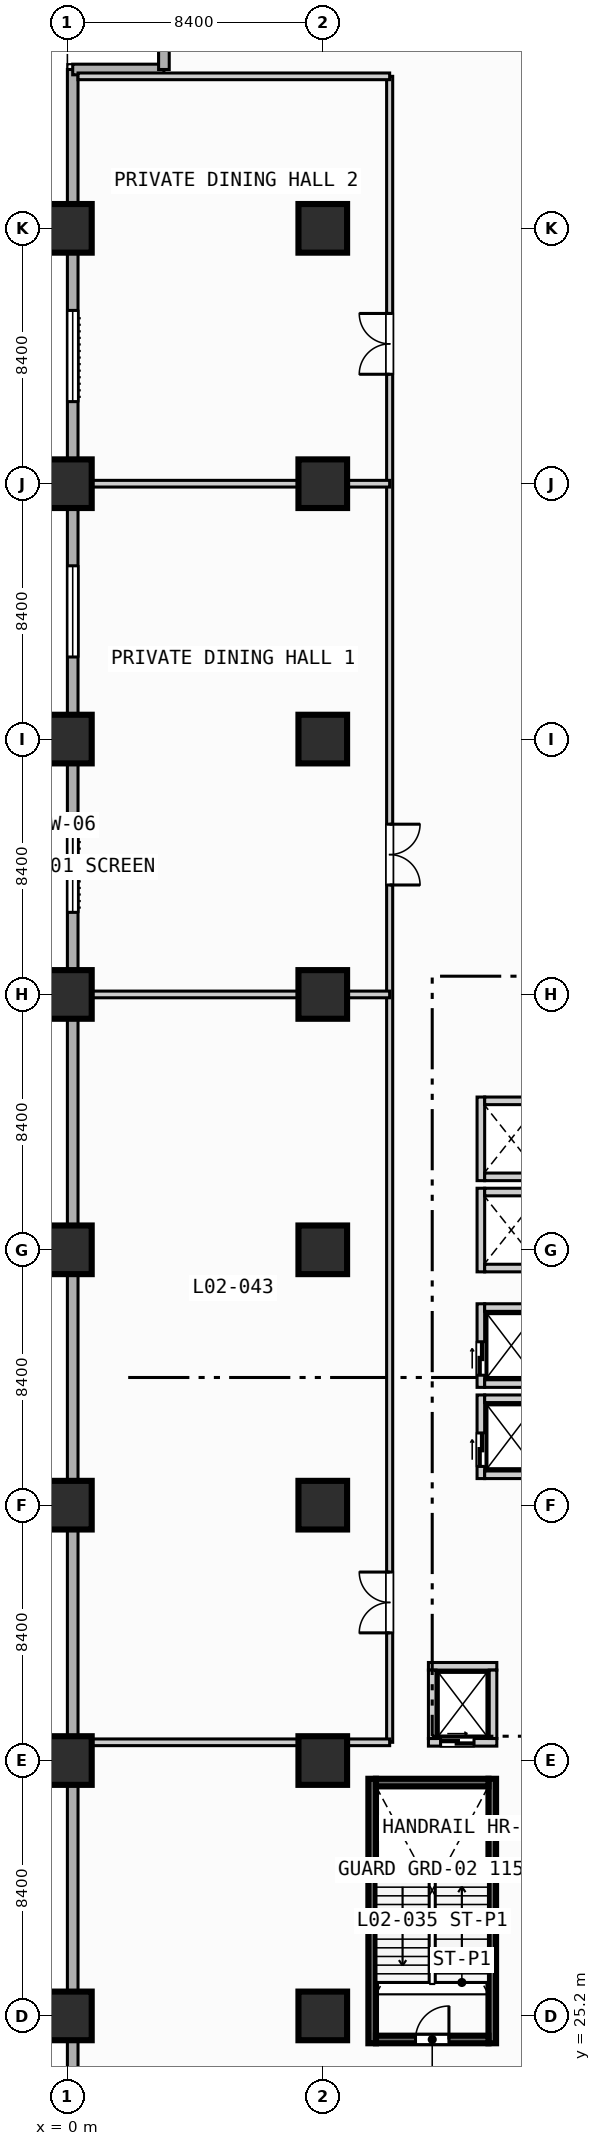
"""IFC4 building model, lengths in metres.
Left out: names, types, materials, properties, quantities, classifications, styles, units other than length and angle.
Written with IfcOpenShell. Run it as: python <this file> out.ifc"""

import sys

from ifc_helpers import new_model, si_unit, direction, frame, frame_2d, origin, origin_2d, place, context, subcontext, project, spatial, rectangle, extrude, element, fill, save


model = new_model("IFC4")
c1 = context("Model", 3, precision=1e-05, world=origin(), true_north=direction((0.0, 1.0)))
c2 = subcontext(c1, "Body", "Model", "MODEL_VIEW")
j1 = project(units=[si_unit("LENGTHUNIT", "METRE"), si_unit("PLANEANGLEUNIT", "RADIAN")], contexts=[c1])
p1 = place(None, origin())
s1 = spatial("IfcSite", under=j1, at=p1, CompositionType="ELEMENT")
p2 = place(p1, origin())
s2 = spatial("IfcBuilding", under=s1, at=p2, CompositionType="ELEMENT")
p3 = place(p2, frame((0.0, 0.0, 10.8)))
s3 = spatial("IfcBuildingStorey", under=s2, at=p3, CompositionType="ELEMENT", Elevation=10.8)
for number, where, z_axis, x_axis in (
    (1, (10.025, 24.3, 0.0), (0.0, 0.0, 1.0), (0.0, 1.0, 0.0)),
    (2, (13.975, 24.3, 0.0), (0.0, 0.0, 1.0), (0.0, 1.0, 0.0)),
):
    element("IfcWall", number, at=place(p3, frame(where, z_axis=z_axis, x_axis=x_axis)), inside=s3, PredefinedType="SOLIDWALL", context=c2, shape_type="SweptSolid", body=[
        extrude(rectangle(XDim=8.7, YDim=0.25, at=frame_2d((4.35, 0.0))), origin(), (0.0, 0.0, 1.0), 4.45),
    ])
p4 = place(p3, frame((10.15, 32.875, 0.0), z_axis=(0.0, 0.0, 1.0), x_axis=(1.0, 0.0, 0.0)))
e3 = element("IfcWall", 3, at=p4, inside=s3, PredefinedType="SOLIDWALL", context=c2, shape_type="SweptSolid", body=[
    extrude(rectangle(XDim=3.7, YDim=0.25, at=frame_2d((1.85, 0.0))), origin(), (0.0, 0.0, 1.0), 4.45),
])
for number, where, z_axis, x_axis in (
    (4, (0.0, 25.2, 0.0), (0.0, 0.0, 1.0), (1.0, 0.0, 0.0)),
    (5, (0.0, 33.6, 0.0), (0.0, 0.0, 1.0), (1.0, 0.0, 0.0)),
    (6, (0.0, 42.0, 0.0), (0.0, 0.0, 1.0), (1.0, 0.0, 0.0)),
    (7, (0.0, 50.4, 0.0), (0.0, 0.0, 1.0), (1.0, 0.0, 0.0)),
    (8, (0.0, 58.8, 0.0), (0.0, 0.0, 1.0), (1.0, 0.0, 0.0)),
    (9, (0.0, 67.2, 0.0), (0.0, 0.0, 1.0), (1.0, 0.0, 0.0)),
    (10, (0.0, 75.6, 0.0), (0.0, 0.0, 1.0), (1.0, 0.0, 0.0)),
    (11, (0.0, 84.0, 0.0), (0.0, 0.0, 1.0), (1.0, 0.0, 0.0)),
    (12, (8.4, 25.2, 0.0), (0.0, 0.0, 1.0), (1.0, 0.0, 0.0)),
    (13, (8.4, 33.6, 0.0), (0.0, 0.0, 1.0), (1.0, 0.0, 0.0)),
    (14, (8.4, 42.0, 0.0), (0.0, 0.0, 1.0), (1.0, 0.0, 0.0)),
    (15, (8.4, 50.4, 0.0), (0.0, 0.0, 1.0), (1.0, 0.0, 0.0)),
    (16, (8.4, 58.8, 0.0), (0.0, 0.0, 1.0), (1.0, 0.0, 0.0)),
    (17, (8.4, 67.2, 0.0), (0.0, 0.0, 1.0), (1.0, 0.0, 0.0)),
    (18, (8.4, 75.6, 0.0), (0.0, 0.0, 1.0), (1.0, 0.0, 0.0)),
    (19, (8.4, 84.0, 0.0), (0.0, 0.0, 1.0), (1.0, 0.0, 0.0)),
):
    element("IfcColumn", number, at=place(p3, frame(where, z_axis=z_axis, x_axis=x_axis)), inside=s3, PredefinedType="COLUMN", context=c2, shape_type="SweptSolid", body=[
        extrude(rectangle(XDim=1.6, YDim=1.6, at=origin_2d()), origin(), (0.0, 0.0, 1.0), 4.8),
    ])
p5 = place(p3, frame((0.175, 3.175, 0.0), z_axis=(0.0, 0.0, 1.0), x_axis=(0.0, 1.0, 0.0)))
e20 = element("IfcWall", 20, at=p5, inside=s3, PredefinedType="STANDARD", context=c2, shape_type="SweptSolid", body=[
    extrude(rectangle(XDim=86.05, YDim=0.35, at=frame_2d((43.025, 0.0))), origin(), (0.0, 0.0, 1.0), 4.45),
])
p6 = place(p5, frame((58.325, 0.0, 0.85)))
e21 = element("IfcOpeningElement", 21, at=p6, cuts=e20, PredefinedType="OPENING", context=c2, shape_type="SweptSolid", body=[
    extrude(rectangle(XDim=3.0, YDim=2.4, at=frame_2d((1.5, 1.2))), frame((0.0, 0.185, 0.0), z_axis=(0.0, -1.0, 0.0), x_axis=(1.0, 0.0, 0.0)), (0.0, 0.0, 1.0), 0.37),
])
p7 = place(p5, frame((66.725, 0.0, 0.85)))
e22 = element("IfcOpeningElement", 22, at=p7, cuts=e20, PredefinedType="OPENING", context=c2, shape_type="SweptSolid", body=[
    extrude(rectangle(XDim=3.0, YDim=2.4, at=frame_2d((1.5, 1.2))), frame((0.0, 0.185, 0.0), z_axis=(0.0, -1.0, 0.0), x_axis=(1.0, 0.0, 0.0)), (0.0, 0.0, 1.0), 0.37),
])
p8 = place(p5, frame((75.125, 0.0, 0.85)))
e23 = element("IfcOpeningElement", 23, at=p8, cuts=e20, PredefinedType="OPENING", context=c2, shape_type="SweptSolid", body=[
    extrude(rectangle(XDim=3.0, YDim=2.4, at=frame_2d((1.5, 1.2))), frame((0.0, 0.185, 0.0), z_axis=(0.0, -1.0, 0.0), x_axis=(1.0, 0.0, 0.0)), (0.0, 0.0, 1.0), 0.37),
])
for number, where, z_axis, x_axis in (
    (24, (0.175, 89.225, 0.0), (0.0, 0.0, 1.0), (1.0, 0.0, 0.0)),
    (25, (3.175, 89.225, 0.0), (0.0, 0.0, 1.0), (0.0, 1.0, 0.0)),
):
    element("IfcWall", number, at=place(p3, frame(where, z_axis=z_axis, x_axis=x_axis)), inside=s3, PredefinedType="STANDARD", context=c2, shape_type="SweptSolid", body=[
        extrude(rectangle(XDim=3.0, YDim=0.35, at=frame_2d((1.5, 0.0))), origin(), (0.0, 0.0, 1.0), 4.45),
    ])
p9 = place(p3, frame((11.875, 34.2, 0.0), z_axis=(0.0, 0.0, 1.0), x_axis=(1.0, 0.0, 0.0)))
e26 = element("IfcWall", 26, at=p9, inside=s3, PredefinedType="SOLIDWALL", context=c2, shape_type="SweptSolid", body=[
    extrude(rectangle(XDim=2.25, YDim=0.25, at=frame_2d((1.125, 0.0))), origin(), (0.0, 0.0, 1.0), 4.45),
])
p10 = place(p9, frame((0.4, 0.0, 0.0)))
e27 = element("IfcOpeningElement", 27, at=p10, cuts=e26, PredefinedType="OPENING", context=c2, shape_type="SweptSolid", body=[
    extrude(rectangle(XDim=1.1, YDim=2.15, at=frame_2d((0.55, 1.075))), frame((0.0, 0.135, 0.0), z_axis=(0.0, -1.0, 0.0), x_axis=(1.0, 0.0, 0.0)), (0.0, 0.0, 1.0), 0.27),
])
for number, where, z_axis, x_axis in (
    (28, (11.875, 36.7, 0.0), (0.0, 0.0, 1.0), (1.0, 0.0, 0.0)),
    (29, (12.0, 34.325, 0.0), (0.0, 0.0, 1.0), (0.0, 1.0, 0.0)),
    (30, (14.0, 34.325, 0.0), (0.0, 0.0, 1.0), (0.0, 1.0, 0.0)),
):
    element("IfcWall", number, at=place(p3, frame(where, z_axis=z_axis, x_axis=x_axis)), inside=s3, PredefinedType="SOLIDWALL", context=c2, shape_type="SweptSolid", body=[
        extrude(rectangle(XDim=2.25, YDim=0.25, at=frame_2d((1.125, 0.0))), origin(), (0.0, 0.0, 1.0), 4.45),
    ])
p11 = place(p3, frame((13.6, 42.875, 0.0), z_axis=(0.0, 0.0, 1.0), x_axis=(0.0, 1.0, 0.0)))
e31 = element("IfcWall", 31, at=p11, inside=s3, PredefinedType="SOLIDWALL", context=c2, shape_type="SweptSolid", body=[
    extrude(rectangle(XDim=2.75, YDim=0.25, at=frame_2d((1.375, 0.0))), origin(), (0.0, 0.0, 1.0), 4.45),
])
p12 = place(p11, frame((0.4, 0.0, 0.0)))
e32 = element("IfcOpeningElement", 32, at=p12, cuts=e31, PredefinedType="OPENING", context=c2, shape_type="SweptSolid", body=[
    extrude(rectangle(XDim=1.1, YDim=2.15, at=frame_2d((0.55, 1.075))), frame((0.0, 0.135, 0.0), z_axis=(0.0, -1.0, 0.0), x_axis=(1.0, 0.0, 0.0)), (0.0, 0.0, 1.0), 0.27),
])
for number, where, z_axis, x_axis in (
    (33, (13.725, 43.0, 0.0), (0.0, 0.0, 1.0), (1.0, 0.0, 0.0)),
    (34, (13.725, 45.5, 0.0), (0.0, 0.0, 1.0), (1.0, 0.0, 0.0)),
):
    element("IfcWall", number, at=place(p3, frame(where, z_axis=z_axis, x_axis=x_axis)), inside=s3, PredefinedType="SOLIDWALL", context=c2, shape_type="SweptSolid", body=[
        extrude(rectangle(XDim=1.75, YDim=0.25, at=frame_2d((0.875, 0.0))), origin(), (0.0, 0.0, 1.0), 4.45),
    ])
p13 = place(p3, frame((13.6, 45.875, 0.0), z_axis=(0.0, 0.0, 1.0), x_axis=(0.0, 1.0, 0.0)))
e35 = element("IfcWall", 35, at=p13, inside=s3, PredefinedType="SOLIDWALL", context=c2, shape_type="SweptSolid", body=[
    extrude(rectangle(XDim=2.75, YDim=0.25, at=frame_2d((1.375, 0.0))), origin(), (0.0, 0.0, 1.0), 4.45),
])
p14 = place(p13, frame((0.4, 0.0, 0.0)))
e36 = element("IfcOpeningElement", 36, at=p14, cuts=e35, PredefinedType="OPENING", context=c2, shape_type="SweptSolid", body=[
    extrude(rectangle(XDim=1.1, YDim=2.15, at=frame_2d((0.55, 1.075))), frame((0.0, 0.135, 0.0), z_axis=(0.0, -1.0, 0.0), x_axis=(1.0, 0.0, 0.0)), (0.0, 0.0, 1.0), 0.27),
])
for number, where, z_axis, x_axis in (
    (37, (13.725, 46.0, 0.0), (0.0, 0.0, 1.0), (1.0, 0.0, 0.0)),
    (38, (13.725, 48.5, 0.0), (0.0, 0.0, 1.0), (1.0, 0.0, 0.0)),
):
    element("IfcWall", number, at=place(p3, frame(where, z_axis=z_axis, x_axis=x_axis)), inside=s3, PredefinedType="SOLIDWALL", context=c2, shape_type="SweptSolid", body=[
        extrude(rectangle(XDim=1.75, YDim=0.25, at=frame_2d((0.875, 0.0))), origin(), (0.0, 0.0, 1.0), 4.45),
    ])
p15 = place(p3, frame((13.6, 49.675, 0.0), z_axis=(0.0, 0.0, 1.0), x_axis=(0.0, 1.0, 0.0)))
e39 = element("IfcWall", 39, at=p15, inside=s3, PredefinedType="SOLIDWALL", context=c2, shape_type="SweptSolid", body=[
    extrude(rectangle(XDim=2.75, YDim=0.25, at=frame_2d((1.375, 0.0))), origin(), (0.0, 0.0, 1.0), 4.45),
])
for number, where, z_axis, x_axis in (
    (40, (13.725, 49.8, 0.0), (0.0, 0.0, 1.0), (1.0, 0.0, 0.0)),
    (41, (13.725, 52.3, 0.0), (0.0, 0.0, 1.0), (1.0, 0.0, 0.0)),
):
    element("IfcWall", number, at=place(p3, frame(where, z_axis=z_axis, x_axis=x_axis)), inside=s3, PredefinedType="SOLIDWALL", context=c2, shape_type="SweptSolid", body=[
        extrude(rectangle(XDim=1.75, YDim=0.25, at=frame_2d((0.875, 0.0))), origin(), (0.0, 0.0, 1.0), 4.45),
    ])
p16 = place(p3, frame((13.6, 52.675, 0.0), z_axis=(0.0, 0.0, 1.0), x_axis=(0.0, 1.0, 0.0)))
e42 = element("IfcWall", 42, at=p16, inside=s3, PredefinedType="SOLIDWALL", context=c2, shape_type="SweptSolid", body=[
    extrude(rectangle(XDim=2.75, YDim=0.25, at=frame_2d((1.375, 0.0))), origin(), (0.0, 0.0, 1.0), 4.45),
])
for number, where, z_axis, x_axis in (
    (43, (13.725, 52.8, 0.0), (0.0, 0.0, 1.0), (1.0, 0.0, 0.0)),
    (44, (13.725, 55.3, 0.0), (0.0, 0.0, 1.0), (1.0, 0.0, 0.0)),
):
    element("IfcWall", number, at=place(p3, frame(where, z_axis=z_axis, x_axis=x_axis)), inside=s3, PredefinedType="SOLIDWALL", context=c2, shape_type="SweptSolid", body=[
        extrude(rectangle(XDim=1.75, YDim=0.25, at=frame_2d((0.875, 0.0))), origin(), (0.0, 0.0, 1.0), 4.45),
    ])
p17 = place(p3, frame((10.15, 24.425, 0.0), z_axis=(0.0, 0.0, 1.0), x_axis=(1.0, 0.0, 0.0)))
e45 = element("IfcWall", 45, at=p17, inside=s3, PredefinedType="SOLIDWALL", context=c2, shape_type="SweptSolid", body=[
    extrude(rectangle(XDim=3.7, YDim=0.25, at=frame_2d((1.85, 0.0))), origin(), (0.0, 0.0, 1.0), 4.45),
])
p18 = place(p17, frame((1.3, 0.0, 0.0)))
e46 = element("IfcOpeningElement", 46, at=p18, cuts=e45, PredefinedType="OPENING", context=c2, shape_type="SweptSolid", body=[
    extrude(rectangle(XDim=1.1, YDim=2.15, at=frame_2d((0.55, 1.075))), frame((0.0, 0.135, 0.0), z_axis=(0.0, -1.0, 0.0), x_axis=(1.0, 0.0, 0.0)), (0.0, 0.0, 1.0), 0.27),
])
p19 = place(p3, frame((10.6, 34.2, 0.0), z_axis=(0.0, 0.0, 1.0), x_axis=(0.0, 1.0, 0.0)))
e47 = element("IfcWall", 47, at=p19, inside=s3, PredefinedType="PARTITIONING", context=c2, shape_type="SweptSolid", body=[
    extrude(rectangle(XDim=54.8, YDim=0.2, at=frame_2d((27.4, 0.0))), origin(), (0.0, 0.0, 1.0), 4.45),
])
p20 = place(p19, frame((3.6, 0.0, 0.0)))
e48 = element("IfcOpeningElement", 48, at=p20, cuts=e47, PredefinedType="OPENING", context=c2, shape_type="SweptSolid", body=[
    extrude(rectangle(XDim=2.0, YDim=2.15, at=frame_2d((1.0, 1.075))), frame((0.0, 0.11, 0.0), z_axis=(0.0, -1.0, 0.0), x_axis=(1.0, 0.0, 0.0)), (0.0, 0.0, 1.0), 0.22),
])
p21 = place(p19, frame((28.2, 0.0, 0.0)))
e49 = element("IfcOpeningElement", 49, at=p21, cuts=e47, PredefinedType="OPENING", context=c2, shape_type="SweptSolid", body=[
    extrude(rectangle(XDim=2.0, YDim=2.15, at=frame_2d((1.0, 1.075))), frame((0.0, 0.11, 0.0), z_axis=(0.0, -1.0, 0.0), x_axis=(1.0, 0.0, 0.0)), (0.0, 0.0, 1.0), 0.22),
])
p22 = place(p19, frame((45.0, 0.0, 0.0)))
e50 = element("IfcOpeningElement", 50, at=p22, cuts=e47, PredefinedType="OPENING", context=c2, shape_type="SweptSolid", body=[
    extrude(rectangle(XDim=2.0, YDim=2.15, at=frame_2d((1.0, 1.075))), frame((0.0, 0.11, 0.0), z_axis=(0.0, -1.0, 0.0), x_axis=(1.0, 0.0, 0.0)), (0.0, 0.0, 1.0), 0.22),
])
p23 = place(p3, frame((0.35, 34.2, 0.0), z_axis=(0.0, 0.0, 1.0), x_axis=(1.0, 0.0, 0.0)))
e51 = element("IfcWall", 51, at=p23, inside=s3, PredefinedType="PARTITIONING", context=c2, shape_type="SweptSolid", body=[
    extrude(rectangle(XDim=10.25, YDim=0.22, at=frame_2d((5.125, 0.0))), origin(), (0.0, 0.0, 1.0), 4.45),
])
for number, where, z_axis, x_axis in (
    (52, (0.35, 58.8, 0.0), (0.0, 0.0, 1.0), (1.0, 0.0, 0.0)),
    (53, (0.35, 75.6, 0.0), (0.0, 0.0, 1.0), (1.0, 0.0, 0.0)),
):
    element("IfcWall", number, at=place(p3, frame(where, z_axis=z_axis, x_axis=x_axis)), inside=s3, PredefinedType="PARTITIONING", context=c2, shape_type="SweptSolid", body=[
        extrude(rectangle(XDim=10.25, YDim=0.22, at=frame_2d((5.125, 0.0))), origin(), (0.0, 0.0, 1.0), 3.6),
    ])
p24 = place(p3, frame((0.35, 89.0, 0.0), z_axis=(0.0, 0.0, 1.0), x_axis=(1.0, 0.0, 0.0)))
e54 = element("IfcWall", 54, at=p24, inside=s3, PredefinedType="PARTITIONING", context=c2, shape_type="SweptSolid", body=[
    extrude(rectangle(XDim=10.25, YDim=0.22, at=frame_2d((5.125, 0.0))), origin(), (0.0, 0.0, 1.0), 4.45),
])
p25 = place(p6, origin())
e55 = element("IfcWindow", 55, at=p25, inside=s3, PartitioningType="SINGLE_PANEL", PredefinedType="WINDOW", context=c2, shape_type="SweptSolid", body=[
    extrude(rectangle(XDim=3.0, YDim=2.4, at=frame_2d((1.5, 1.2))), frame((0.0, 0.03, 0.0), z_axis=(0.0, -1.0, 0.0), x_axis=(1.0, 0.0, 0.0)), (0.0, 0.0, 1.0), 0.06),
])
fill(e21, e55)
p26 = place(p7, origin())
e56 = element("IfcWindow", 56, at=p26, inside=s3, PartitioningType="SINGLE_PANEL", PredefinedType="WINDOW", context=c2, shape_type="SweptSolid", body=[
    extrude(rectangle(XDim=3.0, YDim=2.4, at=frame_2d((1.5, 1.2))), frame((0.0, 0.03, 0.0), z_axis=(0.0, -1.0, 0.0), x_axis=(1.0, 0.0, 0.0)), (0.0, 0.0, 1.0), 0.06),
])
fill(e22, e56)
p27 = place(p8, origin())
e57 = element("IfcWindow", 57, at=p27, inside=s3, PartitioningType="SINGLE_PANEL", PredefinedType="WINDOW", context=c2, shape_type="SweptSolid", body=[
    extrude(rectangle(XDim=3.0, YDim=2.4, at=frame_2d((1.5, 1.2))), frame((0.0, 0.03, 0.0), z_axis=(0.0, -1.0, 0.0), x_axis=(1.0, 0.0, 0.0)), (0.0, 0.0, 1.0), 0.06),
])
fill(e23, e57)
p28 = place(p10, origin())
e58 = element("IfcDoor", 58, at=p28, inside=s3, OperationType="SLIDING_TO_LEFT", PredefinedType="DOOR", context=c2, shape_type="SweptSolid", body=[
    extrude(rectangle(XDim=1.1, YDim=2.15, at=frame_2d((0.55, 1.075))), frame((0.0, 0.025, 0.0), z_axis=(0.0, -1.0, 0.0), x_axis=(1.0, 0.0, 0.0)), (0.0, 0.0, 1.0), 0.05),
])
fill(e27, e58)
p29 = place(p12, origin())
e59 = element("IfcDoor", 59, at=p29, inside=s3, OperationType="SLIDING_TO_LEFT", PredefinedType="DOOR", context=c2, shape_type="SweptSolid", body=[
    extrude(rectangle(XDim=1.1, YDim=2.15, at=frame_2d((0.55, 1.075))), frame((0.0, 0.025, 0.0), z_axis=(0.0, -1.0, 0.0), x_axis=(1.0, 0.0, 0.0)), (0.0, 0.0, 1.0), 0.05),
])
fill(e32, e59)
p30 = place(p14, origin())
e60 = element("IfcDoor", 60, at=p30, inside=s3, OperationType="SLIDING_TO_LEFT", PredefinedType="DOOR", context=c2, shape_type="SweptSolid", body=[
    extrude(rectangle(XDim=1.1, YDim=2.15, at=frame_2d((0.55, 1.075))), frame((0.0, 0.025, 0.0), z_axis=(0.0, -1.0, 0.0), x_axis=(1.0, 0.0, 0.0)), (0.0, 0.0, 1.0), 0.05),
])
fill(e36, e60)
p31 = place(p18, origin())
e61 = element("IfcDoor", 61, at=p31, inside=s3, OperationType="SINGLE_SWING_RIGHT", PredefinedType="DOOR", context=c2, shape_type="SweptSolid", body=[
    extrude(rectangle(XDim=1.1, YDim=2.15, at=frame_2d((0.55, 1.075))), frame((0.0, 0.025, 0.0), z_axis=(0.0, -1.0, 0.0), x_axis=(1.0, 0.0, 0.0)), (0.0, 0.0, 1.0), 0.05),
])
fill(e46, e61)
p32 = place(p20, origin())
e62 = element("IfcDoor", 62, at=p32, inside=s3, OperationType="SINGLE_SWING_LEFT", PredefinedType="DOOR", context=c2, shape_type="SweptSolid", body=[
    extrude(rectangle(XDim=2.0, YDim=2.15, at=frame_2d((1.0, 1.075))), frame((0.0, 0.025, 0.0), z_axis=(0.0, -1.0, 0.0), x_axis=(1.0, 0.0, 0.0)), (0.0, 0.0, 1.0), 0.05),
])
fill(e48, e62)
p33 = place(p21, origin())
e63 = element("IfcDoor", 63, at=p33, inside=s3, OperationType="SINGLE_SWING_RIGHT", PredefinedType="DOOR", context=c2, shape_type="SweptSolid", body=[
    extrude(rectangle(XDim=2.0, YDim=2.15, at=frame_2d((1.0, 1.075))), frame((0.0, 0.025, 0.0), z_axis=(0.0, -1.0, 0.0), x_axis=(1.0, 0.0, 0.0)), (0.0, 0.0, 1.0), 0.05),
])
fill(e49, e63)
p34 = place(p22, origin())
e64 = element("IfcDoor", 64, at=p34, inside=s3, OperationType="SINGLE_SWING_LEFT", PredefinedType="DOOR", context=c2, shape_type="SweptSolid", body=[
    extrude(rectangle(XDim=2.0, YDim=2.15, at=frame_2d((1.0, 1.075))), frame((0.0, 0.025, 0.0), z_axis=(0.0, -1.0, 0.0), x_axis=(1.0, 0.0, 0.0)), (0.0, 0.0, 1.0), 0.05),
])
fill(e50, e64)
save(model, sys.argv[1])
